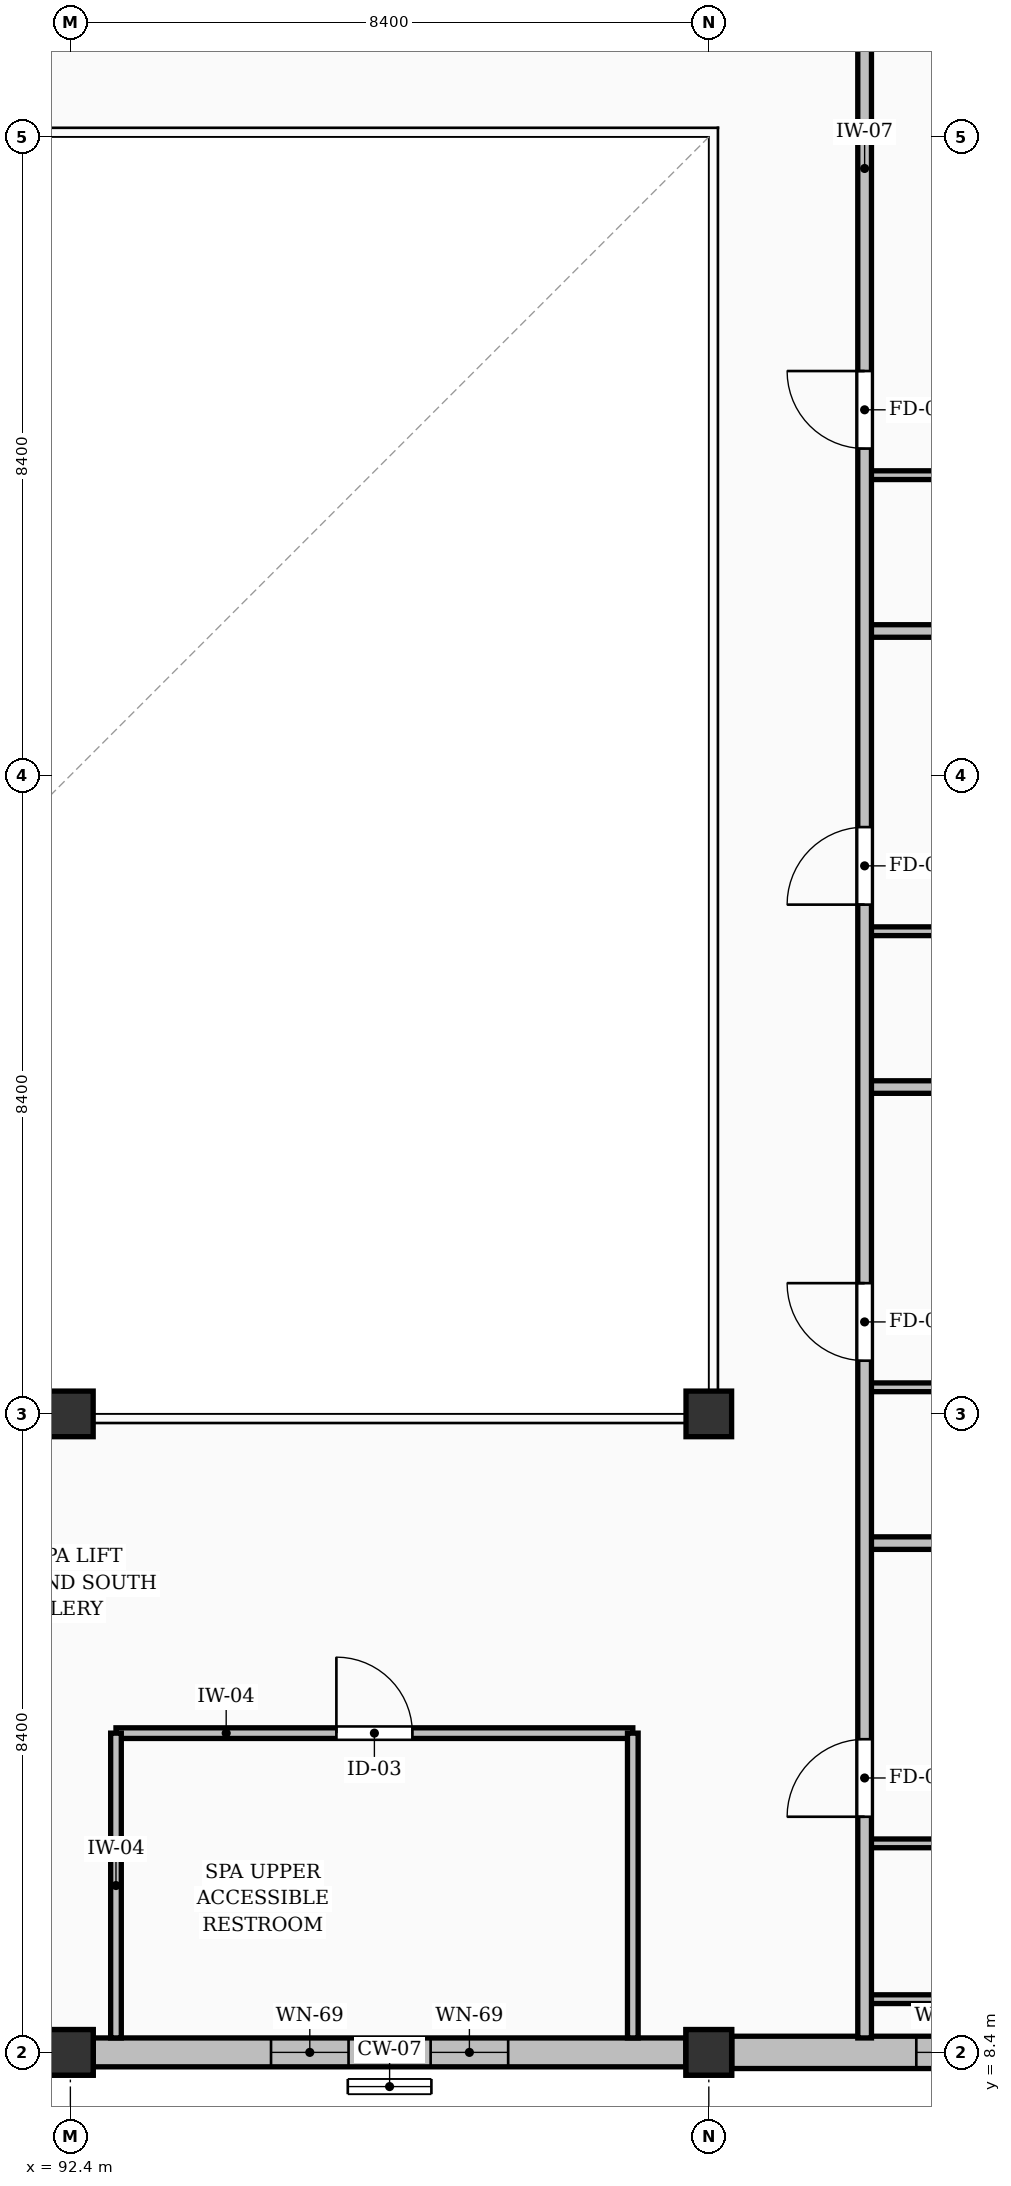
"""IFC4 building model, lengths in metres.
Left out: names, types, materials, properties, quantities, classifications, styles, units other than length and angle.
Written with IfcOpenShell. Run it as: python <this file> out.ifc"""

import sys

from ifc_helpers import new_model, si_unit, direction, frame, frame_2d, origin, origin_2d, place, context, subcontext, project, spatial, rectangle, extrude, element, fill, save


model = new_model("IFC4")
c1 = context("Model", 3, precision=1e-05, world=origin(), true_north=direction((0.0, 1.0)))
c2 = subcontext(c1, "Body", "Model", "MODEL_VIEW")
j1 = project(units=[si_unit("LENGTHUNIT", "METRE"), si_unit("PLANEANGLEUNIT", "RADIAN")], contexts=[c1])
p1 = place(None, origin())
s1 = spatial("IfcSite", under=j1, at=p1, CompositionType="ELEMENT")
p2 = place(p1, origin())
s2 = spatial("IfcBuilding", under=s1, at=p2, CompositionType="ELEMENT")
p3 = place(p2, frame((0.0, 0.0, 3.92)))
s3 = spatial("IfcBuildingStorey", under=s2, at=p3, CompositionType="ELEMENT", Elevation=3.92)
for number, where, z_axis, x_axis in (
    (1, (92.4, 8.4, 0.0), (0.0, 0.0, 1.0), (1.0, 0.0, 0.0)),
    (2, (92.4, 16.8, 0.0), (0.0, 0.0, 1.0), (1.0, 0.0, 0.0)),
    (3, (100.8, 8.4, 0.0), (0.0, 0.0, 1.0), (1.0, 0.0, 0.0)),
    (4, (100.8, 16.8, 0.0), (0.0, 0.0, 1.0), (1.0, 0.0, 0.0)),
):
    element("IfcColumn", number, at=place(p3, frame(where, z_axis=z_axis, x_axis=x_axis)), inside=s3, PredefinedType="COLUMN", context=c2, shape_type="SweptSolid", body=[
        extrude(rectangle(XDim=0.6, YDim=0.6, at=origin_2d()), origin(), (0.0, 0.0, 1.0), 3.64),
    ])
p4 = place(p3, frame((92.4, 8.4, 3.64), z_axis=(0.0, 0.0, 1.0), x_axis=(1.0, 0.0, 0.0)))
e5 = element("IfcColumn", 5, at=p4, inside=s3, PredefinedType="COLUMN", context=c2, shape_type="SweptSolid", body=[
    extrude(rectangle(XDim=0.6, YDim=0.6, at=origin_2d()), origin(), (0.0, 0.0, 1.0), 3.789),
])
p5 = place(p3, frame((100.8, 8.4, 3.64), z_axis=(0.0, 0.0, 1.0), x_axis=(1.0, 0.0, 0.0)))
e6 = element("IfcColumn", 6, at=p5, inside=s3, PredefinedType="COLUMN", context=c2, shape_type="SweptSolid", body=[
    extrude(rectangle(XDim=0.6, YDim=0.6, at=origin_2d()), origin(), (0.0, 0.0, 1.0), 3.754),
])
p6 = place(p3, frame((92.701, 8.4, 0.0), z_axis=(0.0, 0.0, 1.0), x_axis=(1.0, 0.0, 0.0)))
e7 = element("IfcWall", 7, at=p6, inside=s3, PredefinedType="SOLIDWALL", context=c2, shape_type="SweptSolid", body=[
    extrude(rectangle(XDim=7.798, YDim=0.38, at=frame_2d((3.899, 0.0))), origin(), (0.0, 0.0, 1.0), 2.445),
])
p7 = place(p6, frame((2.339, 0.0, 0.3)))
e8 = element("IfcOpeningElement", 8, at=p7, cuts=e7, PredefinedType="OPENING", context=c2, shape_type="SweptSolid", body=[
    extrude(rectangle(XDim=1.02, YDim=1.9, at=frame_2d((0.51, 0.95))), frame((0.0, 0.2, 0.0), z_axis=(0.0, -1.0, 0.0), x_axis=(1.0, 0.0, 0.0)), (0.0, 0.0, 1.0), 0.4),
])
p8 = place(p6, frame((4.439, 0.0, 0.3)))
e9 = element("IfcOpeningElement", 9, at=p8, cuts=e7, PredefinedType="OPENING", context=c2, shape_type="SweptSolid", body=[
    extrude(rectangle(XDim=1.02, YDim=1.9, at=frame_2d((0.51, 0.95))), frame((0.0, 0.2, 0.0), z_axis=(0.0, -1.0, 0.0), x_axis=(1.0, 0.0, 0.0)), (0.0, 0.0, 1.0), 0.4),
])
p9 = place(p3, frame((101.101, 8.4, 0.0), z_axis=(0.0, 0.0, 1.0), x_axis=(1.0, 0.0, 0.0)))
e10 = element("IfcWall", 10, at=p9, inside=s3, PredefinedType="SOLIDWALL", context=c2, shape_type="SweptSolid", body=[
    extrude(rectangle(XDim=7.798, YDim=0.425, at=frame_2d((3.899, 0.0))), origin(), (0.0, 0.0, 1.0), 2.445),
])
p10 = place(p9, frame((2.429, 0.0, 0.3)))
e11 = element("IfcOpeningElement", 11, at=p10, cuts=e10, PredefinedType="OPENING", context=c2, shape_type="SweptSolid", body=[
    extrude(rectangle(XDim=0.84, YDim=1.85, at=frame_2d((0.42, 0.925))), frame((0.0, 0.223, 0.0), z_axis=(0.0, -1.0, 0.0), x_axis=(1.0, 0.0, 0.0)), (0.0, 0.0, 1.0), 0.445),
])
p11 = place(p9, frame((4.529, 0.0, 0.3)))
e12 = element("IfcOpeningElement", 12, at=p11, cuts=e10, PredefinedType="OPENING", context=c2, shape_type="SweptSolid", body=[
    extrude(rectangle(XDim=0.84, YDim=1.85, at=frame_2d((0.42, 0.925))), frame((0.0, 0.223, 0.0), z_axis=(0.0, -1.0, 0.0), x_axis=(1.0, 0.0, 0.0)), (0.0, 0.0, 1.0), 0.445),
])
p12 = place(p3, frame((93.0, 12.6, 0.0), z_axis=(0.0, 0.0, 1.0), x_axis=(1.0, 0.0, 0.0)))
e13 = element("IfcWall", 13, at=p12, inside=s3, PredefinedType="PARTITIONING", context=c2, shape_type="SweptSolid", body=[
    extrude(rectangle(XDim=6.8, YDim=0.14, at=frame_2d((3.4, 0.0))), origin(), (0.0, 0.0, 1.0), 3.405),
])
p13 = place(p12, frame((2.9, 0.0, 0.0)))
e14 = element("IfcOpeningElement", 14, at=p13, cuts=e13, PredefinedType="OPENING", context=c2, shape_type="SweptSolid", body=[
    extrude(rectangle(XDim=1.0, YDim=2.1, at=frame_2d((0.5, 1.05))), frame((0.0, 0.08, 0.0), z_axis=(0.0, -1.0, 0.0), x_axis=(1.0, 0.0, 0.0)), (0.0, 0.0, 1.0), 0.16),
])
for number, where, z_axis, x_axis in (
    (15, (93.0, 8.59, 0.0), (0.0, 0.0, 1.0), (0.0, 1.0, 0.0)),
    (16, (99.8, 8.59, 0.0), (0.0, 0.0, 1.0), (0.0, 1.0, 0.0)),
):
    element("IfcWall", number, at=place(p3, frame(where, z_axis=z_axis, x_axis=x_axis)), inside=s3, PredefinedType="PARTITIONING", context=c2, shape_type="SweptSolid", body=[
        extrude(rectangle(XDim=4.01, YDim=0.14, at=frame_2d((2.005, 0.0))), origin(), (0.0, 0.0, 1.0), 3.405),
    ])
for number, where, z_axis, x_axis in (
    (17, (102.85, 11.15, 0.0), (0.0, 0.0, 1.0), (1.0, 0.0, 0.0)),
    (18, (102.85, 9.1, 0.0), (0.0, 0.0, 1.0), (1.0, 0.0, 0.0)),
    (19, (102.85, 17.15, 0.0), (0.0, 0.0, 1.0), (1.0, 0.0, 0.0)),
):
    element("IfcWall", number, at=place(p3, frame(where, z_axis=z_axis, x_axis=x_axis)), inside=s3, PredefinedType="PARTITIONING", context=c2, shape_type="SweptSolid", body=[
        extrude(rectangle(XDim=2.1, YDim=0.115, at=frame_2d((1.05, 0.0))), origin(), (0.0, 0.0, 1.0), 3.405),
    ])
p14 = place(p3, frame((102.85, 15.1, 0.0), z_axis=(0.0, 0.0, 1.0), x_axis=(1.0, 0.0, 0.0)))
e20 = element("IfcWall", 20, at=p14, inside=s3, PredefinedType="PARTITIONING", context=c2, shape_type="SweptSolid", body=[
    extrude(rectangle(XDim=6.188, YDim=0.165, at=frame_2d((3.094, 0.0))), origin(), (0.0, 0.0, 1.0), 3.405),
])
p15 = place(p3, frame((102.85, 23.15, 0.0), z_axis=(0.0, 0.0, 1.0), x_axis=(1.0, 0.0, 0.0)))
e21 = element("IfcWall", 21, at=p15, inside=s3, PredefinedType="PARTITIONING", context=c2, shape_type="SweptSolid", body=[
    extrude(rectangle(XDim=2.1, YDim=0.115, at=frame_2d((1.05, 0.0))), origin(), (0.0, 0.0, 1.0), 3.405),
])
p16 = place(p3, frame((102.85, 21.1, 0.0), z_axis=(0.0, 0.0, 1.0), x_axis=(1.0, 0.0, 0.0)))
e22 = element("IfcWall", 22, at=p16, inside=s3, PredefinedType="PARTITIONING", context=c2, shape_type="SweptSolid", body=[
    extrude(rectangle(XDim=6.175, YDim=0.165, at=frame_2d((3.087, 0.0))), origin(), (0.0, 0.0, 1.0), 3.405),
])
p17 = place(p3, frame((102.85, 29.15, 0.0), z_axis=(0.0, 0.0, 1.0), x_axis=(1.0, 0.0, 0.0)))
e23 = element("IfcWall", 23, at=p17, inside=s3, PredefinedType="PARTITIONING", context=c2, shape_type="SweptSolid", body=[
    extrude(rectangle(XDim=2.1, YDim=0.115, at=frame_2d((1.05, 0.0))), origin(), (0.0, 0.0, 1.0), 3.405),
])
p18 = place(p3, frame((102.85, 27.1, 0.0), z_axis=(0.0, 0.0, 1.0), x_axis=(1.0, 0.0, 0.0)))
e24 = element("IfcWall", 24, at=p18, inside=s3, PredefinedType="PARTITIONING", context=c2, shape_type="SweptSolid", body=[
    extrude(rectangle(XDim=6.16, YDim=0.165, at=frame_2d((3.08, 0.0))), origin(), (0.0, 0.0, 1.0), 3.405),
])
p19 = place(p3, frame((102.85, 8.59, 0.0), z_axis=(0.0, 0.0, 1.0), x_axis=(0.0, 1.0, 0.0)))
e25 = element("IfcWall", 25, at=p19, inside=s3, PredefinedType="PARTITIONING", context=c2, shape_type="SweptSolid", body=[
    extrude(rectangle(XDim=27.26, YDim=0.18, at=frame_2d((13.63, 0.0))), origin(), (0.0, 0.0, 1.0), 3.405),
])
p20 = place(p19, frame((2.91, 0.0, 0.0)))
e26 = element("IfcOpeningElement", 26, at=p20, cuts=e25, PredefinedType="OPENING", context=c2, shape_type="SweptSolid", body=[
    extrude(rectangle(XDim=1.02, YDim=2.15, at=frame_2d((0.51, 1.075))), frame((0.0, 0.1, 0.0), z_axis=(0.0, -1.0, 0.0), x_axis=(1.0, 0.0, 0.0)), (0.0, 0.0, 1.0), 0.2),
])
p21 = place(p19, frame((8.91, 0.0, 0.0)))
e27 = element("IfcOpeningElement", 27, at=p21, cuts=e25, PredefinedType="OPENING", context=c2, shape_type="SweptSolid", body=[
    extrude(rectangle(XDim=1.02, YDim=2.15, at=frame_2d((0.51, 1.075))), frame((0.0, 0.1, 0.0), z_axis=(0.0, -1.0, 0.0), x_axis=(1.0, 0.0, 0.0)), (0.0, 0.0, 1.0), 0.2),
])
p22 = place(p19, frame((14.91, 0.0, 0.0)))
e28 = element("IfcOpeningElement", 28, at=p22, cuts=e25, PredefinedType="OPENING", context=c2, shape_type="SweptSolid", body=[
    extrude(rectangle(XDim=1.02, YDim=2.15, at=frame_2d((0.51, 1.075))), frame((0.0, 0.1, 0.0), z_axis=(0.0, -1.0, 0.0), x_axis=(1.0, 0.0, 0.0)), (0.0, 0.0, 1.0), 0.2),
])
p23 = place(p19, frame((20.91, 0.0, 0.0)))
e29 = element("IfcOpeningElement", 29, at=p23, cuts=e25, PredefinedType="OPENING", context=c2, shape_type="SweptSolid", body=[
    extrude(rectangle(XDim=1.02, YDim=2.15, at=frame_2d((0.51, 1.075))), frame((0.0, 0.1, 0.0), z_axis=(0.0, -1.0, 0.0), x_axis=(1.0, 0.0, 0.0)), (0.0, 0.0, 1.0), 0.2),
])
p24 = place(p7, origin())
e30 = element("IfcWindow", 30, at=p24, inside=s3, PartitioningType="SINGLE_PANEL", PredefinedType="WINDOW", context=c2, shape_type="SweptSolid", body=[
    extrude(rectangle(XDim=1.02, YDim=1.9, at=frame_2d((0.51, 0.95))), frame((0.0, 0.03, 0.0), z_axis=(0.0, -1.0, 0.0), x_axis=(1.0, 0.0, 0.0)), (0.0, 0.0, 1.0), 0.06),
])
fill(e8, e30)
p25 = place(p8, origin())
e31 = element("IfcWindow", 31, at=p25, inside=s3, PartitioningType="SINGLE_PANEL", PredefinedType="WINDOW", context=c2, shape_type="SweptSolid", body=[
    extrude(rectangle(XDim=1.02, YDim=1.9, at=frame_2d((0.51, 0.95))), frame((0.0, 0.03, 0.0), z_axis=(0.0, -1.0, 0.0), x_axis=(1.0, 0.0, 0.0)), (0.0, 0.0, 1.0), 0.06),
])
fill(e9, e31)
p26 = place(p10, origin())
e32 = element("IfcWindow", 32, at=p26, inside=s3, PartitioningType="SINGLE_PANEL", PredefinedType="WINDOW", context=c2, shape_type="SweptSolid", body=[
    extrude(rectangle(XDim=0.84, YDim=1.85, at=frame_2d((0.42, 0.925))), frame((0.0, 0.03, 0.0), z_axis=(0.0, -1.0, 0.0), x_axis=(1.0, 0.0, 0.0)), (0.0, 0.0, 1.0), 0.06),
])
fill(e11, e32)
p27 = place(p13, origin())
e33 = element("IfcDoor", 33, at=p27, inside=s3, OperationType="SINGLE_SWING_LEFT", PredefinedType="DOOR", context=c2, shape_type="SweptSolid", body=[
    extrude(rectangle(XDim=1.0, YDim=2.1, at=frame_2d((0.5, 1.05))), frame((0.0, 0.025, 0.0), z_axis=(0.0, -1.0, 0.0), x_axis=(1.0, 0.0, 0.0)), (0.0, 0.0, 1.0), 0.05),
])
fill(e14, e33)
p28 = place(p20, origin())
e34 = element("IfcDoor", 34, at=p28, inside=s3, OperationType="SINGLE_SWING_LEFT", PredefinedType="DOOR", context=c2, shape_type="SweptSolid", body=[
    extrude(rectangle(XDim=1.02, YDim=2.15, at=frame_2d((0.51, 1.075))), frame((0.0, 0.025, 0.0), z_axis=(0.0, -1.0, 0.0), x_axis=(1.0, 0.0, 0.0)), (0.0, 0.0, 1.0), 0.05),
])
fill(e26, e34)
p29 = place(p21, origin())
e35 = element("IfcDoor", 35, at=p29, inside=s3, OperationType="SINGLE_SWING_RIGHT", PredefinedType="DOOR", context=c2, shape_type="SweptSolid", body=[
    extrude(rectangle(XDim=1.02, YDim=2.15, at=frame_2d((0.51, 1.075))), frame((0.0, 0.025, 0.0), z_axis=(0.0, -1.0, 0.0), x_axis=(1.0, 0.0, 0.0)), (0.0, 0.0, 1.0), 0.05),
])
fill(e27, e35)
p30 = place(p22, origin())
e36 = element("IfcDoor", 36, at=p30, inside=s3, OperationType="SINGLE_SWING_LEFT", PredefinedType="DOOR", context=c2, shape_type="SweptSolid", body=[
    extrude(rectangle(XDim=1.02, YDim=2.15, at=frame_2d((0.51, 1.075))), frame((0.0, 0.025, 0.0), z_axis=(0.0, -1.0, 0.0), x_axis=(1.0, 0.0, 0.0)), (0.0, 0.0, 1.0), 0.05),
])
fill(e28, e36)
p31 = place(p23, origin())
e37 = element("IfcDoor", 37, at=p31, inside=s3, OperationType="SINGLE_SWING_RIGHT", PredefinedType="DOOR", context=c2, shape_type="SweptSolid", body=[
    extrude(rectangle(XDim=1.02, YDim=2.15, at=frame_2d((0.51, 1.075))), frame((0.0, 0.025, 0.0), z_axis=(0.0, -1.0, 0.0), x_axis=(1.0, 0.0, 0.0)), (0.0, 0.0, 1.0), 0.05),
])
fill(e29, e37)
save(model, sys.argv[1])
